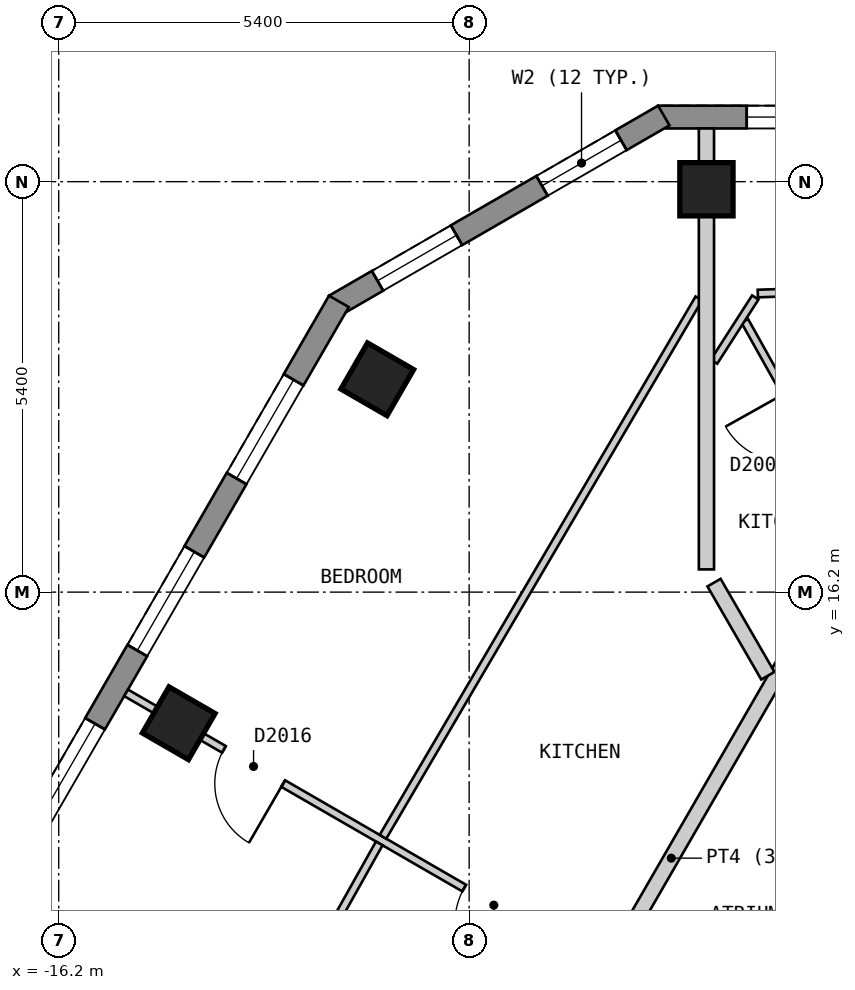
"""IFC4 building model, lengths in metres.
Left out: names, types, materials, properties, quantities, classifications, styles, units other than length and angle.
Written with IfcOpenShell. Run it as: python <this file> out.ifc"""

import sys

from ifc_helpers import new_model, si_unit, direction, frame, frame_2d, origin, origin_2d, place, context, subcontext, project, spatial, polyline, rectangle, outline, extrude, element, fill, save


model = new_model("IFC4")
c1 = context("Model", 3, precision=1e-05, world=origin(), true_north=direction((0.0, 1.0)))
c2 = subcontext(c1, "Body", "Model", "MODEL_VIEW")
j1 = project(units=[si_unit("LENGTHUNIT", "METRE"), si_unit("PLANEANGLEUNIT", "RADIAN")], contexts=[c1])
p1 = place(None, origin())
s1 = spatial("IfcSite", under=j1, at=p1, CompositionType="ELEMENT")
p2 = place(p1, origin())
s2 = spatial("IfcBuilding", under=s1, at=p2, CompositionType="ELEMENT")
p3 = place(p2, frame((0.0, 0.0, 238.8)))
s3 = spatial("IfcBuildingStorey", under=s2, at=p3, CompositionType="ELEMENT", Elevation=238.8)
for number, where, z_axis, x_axis in (
    (1, (-7.678, 21.5, 0.0), (0.0, 0.0, 1.0), (-1.0, 0.0, 0.0)),
    (2, (-12.009, 19.0, 0.0), (0.0, 0.0, 1.0), (-0.5, -0.866, 0.0)),
    (3, (-14.621, 14.475, 0.0), (0.0, 0.0, 1.0), (-0.5, -0.866, 0.0)),
):
    element("IfcColumn", number, at=place(p3, frame(where, z_axis=z_axis, x_axis=x_axis)), inside=s3, PredefinedType="COLUMN", context=c2, shape_type="SweptSolid", body=[
        extrude(rectangle(XDim=0.7, YDim=0.7, at=origin_2d()), origin(), (0.0, 0.0, 1.0), 3.0),
    ])
p4 = place(p3, frame((8.314, 22.45, 0.0), z_axis=(0.0, 0.0, 1.0), x_axis=(-1.0, 0.0, 0.0)))
e4 = element("IfcWall", 4, at=p4, inside=s3, PredefinedType="SOLIDWALL", context=c2, shape_type="SweptSolid", body=[
    extrude(outline(polyline([(0.0, -0.15), (16.628, -0.15), (16.548, 0.15), (0.08, 0.15), (0.0, -0.15)])), origin(), (0.0, 0.0, 1.0), 2.7),
])
p5 = place(p4, frame((1.165, 0.0, 0.15)))
e5 = element("IfcOpeningElement", 5, at=p5, cuts=e4, PredefinedType="OPENING", context=c2, shape_type="SweptSolid", body=[
    extrude(rectangle(XDim=1.5, YDim=2.1, at=frame_2d((0.75, 1.05))), frame((0.0, 0.16, 0.0), z_axis=(0.0, -1.0, 0.0), x_axis=(1.0, 0.0, 0.0)), (0.0, 0.0, 1.0), 0.32),
])
p6 = place(p4, frame((3.724, 0.0, 0.15)))
e6 = element("IfcOpeningElement", 6, at=p6, cuts=e4, PredefinedType="OPENING", context=c2, shape_type="SweptSolid", body=[
    extrude(rectangle(XDim=1.5, YDim=2.1, at=frame_2d((0.75, 1.05))), frame((0.0, 0.16, 0.0), z_axis=(0.0, -1.0, 0.0), x_axis=(1.0, 0.0, 0.0)), (0.0, 0.0, 1.0), 0.32),
])
p7 = place(p4, frame((6.284, 0.0, 0.15)))
e7 = element("IfcOpeningElement", 7, at=p7, cuts=e4, PredefinedType="OPENING", context=c2, shape_type="SweptSolid", body=[
    extrude(rectangle(XDim=1.5, YDim=2.1, at=frame_2d((0.75, 1.05))), frame((0.0, 0.16, 0.0), z_axis=(0.0, -1.0, 0.0), x_axis=(1.0, 0.0, 0.0)), (0.0, 0.0, 1.0), 0.32),
])
p8 = place(p4, frame((8.843, 0.0, 0.15)))
e8 = element("IfcOpeningElement", 8, at=p8, cuts=e4, PredefinedType="OPENING", context=c2, shape_type="SweptSolid", body=[
    extrude(rectangle(XDim=1.5, YDim=2.1, at=frame_2d((0.75, 1.05))), frame((0.0, 0.16, 0.0), z_axis=(0.0, -1.0, 0.0), x_axis=(1.0, 0.0, 0.0)), (0.0, 0.0, 1.0), 0.32),
])
p9 = place(p4, frame((11.403, 0.0, 0.15)))
e9 = element("IfcOpeningElement", 9, at=p9, cuts=e4, PredefinedType="OPENING", context=c2, shape_type="SweptSolid", body=[
    extrude(rectangle(XDim=1.5, YDim=2.1, at=frame_2d((0.75, 1.05))), frame((0.0, 0.16, 0.0), z_axis=(0.0, -1.0, 0.0), x_axis=(1.0, 0.0, 0.0)), (0.0, 0.0, 1.0), 0.32),
])
p10 = place(p4, frame((13.962, 0.0, 0.15)))
e10 = element("IfcOpeningElement", 10, at=p10, cuts=e4, PredefinedType="OPENING", context=c2, shape_type="SweptSolid", body=[
    extrude(rectangle(XDim=1.5, YDim=2.1, at=frame_2d((0.75, 1.05))), frame((0.0, 0.16, 0.0), z_axis=(0.0, -1.0, 0.0), x_axis=(1.0, 0.0, 0.0)), (0.0, 0.0, 1.0), 0.32),
])
p11 = place(p3, frame((-8.239, 22.47, 0.0), z_axis=(0.0, 0.0, 1.0), x_axis=(-0.866022959057, -0.500004234368, 0.0)))
e11 = element("IfcWall", 11, at=p11, inside=s3, PredefinedType="SOLIDWALL", context=c2, shape_type="SweptSolid", body=[
    extrude(outline(polyline([(0.0, -0.15), (5.0, -0.15), (4.92, 0.15), (0.08, 0.15), (0.0, -0.15)])), origin(), (0.0, 0.0, 1.0), 2.7),
])
p12 = place(p11, frame((0.65, 0.0, 0.15)))
e12 = element("IfcOpeningElement", 12, at=p12, cuts=e11, PredefinedType="OPENING", context=c2, shape_type="SweptSolid", body=[
    extrude(rectangle(XDim=1.2, YDim=2.1, at=frame_2d((0.6, 1.05))), frame((0.0, 0.16, 0.0), z_axis=(0.0, -1.0, 0.0), x_axis=(1.0, 0.0, 0.0)), (0.0, 0.0, 1.0), 0.32),
])
p13 = place(p11, frame((3.149, 0.0, 0.15)))
e13 = element("IfcOpeningElement", 13, at=p13, cuts=e11, PredefinedType="OPENING", context=c2, shape_type="SweptSolid", body=[
    extrude(rectangle(XDim=1.2, YDim=2.1, at=frame_2d((0.6, 1.05))), frame((0.0, 0.16, 0.0), z_axis=(0.0, -1.0, 0.0), x_axis=(1.0, 0.0, 0.0)), (0.0, 0.0, 1.0), 0.32),
])
p14 = place(p3, frame((-12.514, 20.025, 0.0), z_axis=(0.0, 0.0, 1.0), x_axis=(-0.500003656944, -0.866023292436, 0.0)))
e14 = element("IfcWall", 14, at=p14, inside=s3, PredefinedType="SOLIDWALL", context=c2, shape_type="SweptSolid", body=[
    extrude(outline(polyline([(0.0, -0.15), (22.17, -0.15), (22.09, 0.15), (0.08, 0.15), (0.0, -0.15)])), origin(), (0.0, 0.0, 1.0), 2.7),
])
p15 = place(p14, frame((1.191, 0.0, 0.15)))
e15 = element("IfcOpeningElement", 15, at=p15, cuts=e14, PredefinedType="OPENING", context=c2, shape_type="SweptSolid", body=[
    extrude(rectangle(XDim=1.5, YDim=2.1, at=frame_2d((0.75, 1.05))), frame((0.0, 0.16, 0.0), z_axis=(0.0, -1.0, 0.0), x_axis=(1.0, 0.0, 0.0)), (0.0, 0.0, 1.0), 0.32),
])
p16 = place(p14, frame((3.804, 0.0, 0.15)))
e16 = element("IfcOpeningElement", 16, at=p16, cuts=e14, PredefinedType="OPENING", context=c2, shape_type="SweptSolid", body=[
    extrude(rectangle(XDim=1.5, YDim=2.1, at=frame_2d((0.75, 1.05))), frame((0.0, 0.16, 0.0), z_axis=(0.0, -1.0, 0.0), x_axis=(1.0, 0.0, 0.0)), (0.0, 0.0, 1.0), 0.32),
])
p17 = place(p14, frame((6.416, 0.0, 0.15)))
e17 = element("IfcOpeningElement", 17, at=p17, cuts=e14, PredefinedType="OPENING", context=c2, shape_type="SweptSolid", body=[
    extrude(rectangle(XDim=1.5, YDim=2.1, at=frame_2d((0.75, 1.05))), frame((0.0, 0.16, 0.0), z_axis=(0.0, -1.0, 0.0), x_axis=(1.0, 0.0, 0.0)), (0.0, 0.0, 1.0), 0.32),
])
p18 = place(p14, frame((9.029, 0.0, 0.15)))
e18 = element("IfcOpeningElement", 18, at=p18, cuts=e14, PredefinedType="OPENING", context=c2, shape_type="SweptSolid", body=[
    extrude(rectangle(XDim=1.5, YDim=2.1, at=frame_2d((0.75, 1.05))), frame((0.0, 0.16, 0.0), z_axis=(0.0, -1.0, 0.0), x_axis=(1.0, 0.0, 0.0)), (0.0, 0.0, 1.0), 0.32),
])
p19 = place(p14, frame((11.641, 0.0, 0.15)))
e19 = element("IfcOpeningElement", 19, at=p19, cuts=e14, PredefinedType="OPENING", context=c2, shape_type="SweptSolid", body=[
    extrude(rectangle(XDim=1.5, YDim=2.1, at=frame_2d((0.75, 1.05))), frame((0.0, 0.16, 0.0), z_axis=(0.0, -1.0, 0.0), x_axis=(1.0, 0.0, 0.0)), (0.0, 0.0, 1.0), 0.32),
])
p20 = place(p14, frame((14.254, 0.0, 0.15)))
e20 = element("IfcOpeningElement", 20, at=p20, cuts=e14, PredefinedType="OPENING", context=c2, shape_type="SweptSolid", body=[
    extrude(rectangle(XDim=1.5, YDim=2.1, at=frame_2d((0.75, 1.05))), frame((0.0, 0.16, 0.0), z_axis=(0.0, -1.0, 0.0), x_axis=(1.0, 0.0, 0.0)), (0.0, 0.0, 1.0), 0.32),
])
p21 = place(p14, frame((16.866, 0.0, 0.15)))
e21 = element("IfcOpeningElement", 21, at=p21, cuts=e14, PredefinedType="OPENING", context=c2, shape_type="SweptSolid", body=[
    extrude(rectangle(XDim=1.5, YDim=2.1, at=frame_2d((0.75, 1.05))), frame((0.0, 0.16, 0.0), z_axis=(0.0, -1.0, 0.0), x_axis=(1.0, 0.0, 0.0)), (0.0, 0.0, 1.0), 0.32),
])
p22 = place(p14, frame((19.479, 0.0, 0.15)))
e22 = element("IfcOpeningElement", 22, at=p22, cuts=e14, PredefinedType="OPENING", context=c2, shape_type="SweptSolid", body=[
    extrude(rectangle(XDim=1.5, YDim=2.1, at=frame_2d((0.75, 1.05))), frame((0.0, 0.16, 0.0), z_axis=(0.0, -1.0, 0.0), x_axis=(1.0, 0.0, 0.0)), (0.0, 0.0, 1.0), 0.32),
])
p23 = place(p3, frame((-10.854, 8.0, 0.0), z_axis=(0.0, 0.0, 1.0), x_axis=(0.499997637144, 0.866026767976, 0.0)))
e23 = element("IfcWall", 23, at=p23, inside=s3, PredefinedType="PARTITIONING", context=c2, shape_type="SweptSolid", body=[
    extrude(rectangle(XDim=10.854, YDim=0.2, at=frame_2d((5.427, 0.0))), origin(), (0.0, 0.0, 1.0), 2.7),
])
p24 = place(p23, frame((0.612, 0.0, 0.0)))
e24 = element("IfcOpeningElement", 24, at=p24, cuts=e23, PredefinedType="OPENING", context=c2, shape_type="SweptSolid", body=[
    extrude(rectangle(XDim=1.0, YDim=2.1, at=frame_2d((0.5, 1.05))), frame((0.0, 0.11, 0.0), z_axis=(0.0, -1.0, 0.0), x_axis=(1.0, 0.0, 0.0)), (0.0, 0.0, 1.0), 0.22),
])
p25 = place(p3, frame((-7.174, 19.769, 0.0), z_axis=(0.0, 0.0, 1.0), x_axis=(0.488445917321, -0.872594170192, 0.0)))
e25 = element("IfcWall", 25, at=p25, inside=s3, PredefinedType="PARTITIONING", context=c2, shape_type="SweptSolid", body=[
    extrude(rectangle(XDim=3.022, YDim=0.1, at=frame_2d((1.511, 0.0))), origin(), (0.0, 0.0, 1.0), 2.7),
])
p26 = place(p25, frame((1.091, 0.0, 0.0)))
e26 = element("IfcOpeningElement", 26, at=p26, cuts=e25, PredefinedType="OPENING", context=c2, shape_type="SweptSolid", body=[
    extrude(rectangle(XDim=0.9, YDim=2.1, at=frame_2d((0.45, 1.05))), frame((0.0, 0.06, 0.0), z_axis=(0.0, -1.0, 0.0), x_axis=(1.0, 0.0, 0.0)), (0.0, 0.0, 1.0), 0.12),
])
p27 = place(p3, frame((-15.314, 14.875, 0.0), z_axis=(0.0, 0.0, 1.0), x_axis=(0.866001485781, -0.500041424909, 0.0)))
e27 = element("IfcWall", 27, at=p27, inside=s3, PredefinedType="PARTITIONING", context=c2, shape_type="SweptSolid", body=[
    extrude(rectangle(XDim=7.2, YDim=0.1, at=frame_2d((3.6, 0.0))), origin(), (0.0, 0.0, 1.0), 2.7),
])
p28 = place(p27, frame((5.137, 0.0, 0.0)))
e28 = element("IfcOpeningElement", 28, at=p28, cuts=e27, PredefinedType="OPENING", context=c2, shape_type="SweptSolid", body=[
    extrude(rectangle(XDim=0.9, YDim=2.1, at=frame_2d((0.45, 1.05))), frame((0.0, 0.06, 0.0), z_axis=(0.0, -1.0, 0.0), x_axis=(1.0, 0.0, 0.0)), (0.0, 0.0, 1.0), 0.12),
])
p29 = place(p27, frame((1.487, 0.0, 0.0)))
e29 = element("IfcOpeningElement", 29, at=p29, cuts=e27, PredefinedType="OPENING", context=c2, shape_type="SweptSolid", body=[
    extrude(rectangle(XDim=0.9, YDim=2.1, at=frame_2d((0.45, 1.05))), frame((0.0, 0.06, 0.0), z_axis=(0.0, -1.0, 0.0), x_axis=(1.0, 0.0, 0.0)), (0.0, 0.0, 1.0), 0.12),
])
p30 = place(p3, frame((-7.578, 19.232, 0.0), z_axis=(0.0, 0.0, 1.0), x_axis=(0.540597871913, 0.841281130707, 0.0)))
e30 = element("IfcWall", 30, at=p30, inside=s3, PredefinedType="PARTITIONING", context=c2, shape_type="SweptSolid", body=[
    extrude(rectangle(XDim=1.004, YDim=0.1, at=frame_2d((0.502, 0.0))), origin(), (0.0, 0.0, 1.0), 2.7),
])
p31 = place(p3, frame((-11.934, 12.981, 0.0), z_axis=(0.0, 0.0, 1.0), x_axis=(0.506072703404, 0.862490822484, 0.0)))
e31 = element("IfcWall", 31, at=p31, inside=s3, PredefinedType="PARTITIONING", context=c2, shape_type="SweptSolid", body=[
    extrude(rectangle(XDim=8.212, YDim=0.1, at=frame_2d((4.106, 0.0))), origin(), (0.0, 0.0, 1.0), 2.7),
])
p32 = place(p3, frame((-14.488, 8.423, 0.0), z_axis=(0.0, 0.0, 1.0), x_axis=(0.488810791055, 0.872389827169, 0.0)))
e32 = element("IfcWall", 32, at=p32, inside=s3, PredefinedType="PARTITIONING", context=c2, shape_type="SweptSolid", body=[
    extrude(rectangle(XDim=5.125, YDim=0.1, at=frame_2d((2.562, 0.0))), origin(), (0.0, 0.0, 1.0), 2.7),
])
p33 = place(p32, frame((2.113, 0.0, 0.0)))
e33 = element("IfcOpeningElement", 33, at=p33, cuts=e32, PredefinedType="OPENING", context=c2, shape_type="SweptSolid", body=[
    extrude(rectangle(XDim=0.9, YDim=2.1, at=frame_2d((0.45, 1.05))), frame((0.0, 0.06, 0.0), z_axis=(0.0, -1.0, 0.0), x_axis=(1.0, 0.0, 0.0)), (0.0, 0.0, 1.0), 0.12),
])
p34 = place(p3, frame((-7.002, 20.128, 0.0), z_axis=(0.0, 0.0, 1.0), x_axis=(0.999429293715, 0.033779977274, 0.0)))
e34 = element("IfcWall", 34, at=p34, inside=s3, PredefinedType="PARTITIONING", context=c2, shape_type="SweptSolid", body=[
    extrude(rectangle(XDim=2.132, YDim=0.1, at=frame_2d((1.066, 0.0))), origin(), (0.0, 0.0, 1.0), 2.7),
])
p35 = place(p34, frame((0.616, 0.0, 0.0)))
e35 = element("IfcOpeningElement", 35, at=p35, cuts=e34, PredefinedType="OPENING", context=c2, shape_type="SweptSolid", body=[
    extrude(rectangle(XDim=0.9, YDim=2.1, at=frame_2d((0.45, 1.05))), frame((0.0, 0.06, 0.0), z_axis=(0.0, -1.0, 0.0), x_axis=(1.0, 0.0, 0.0)), (0.0, 0.0, 1.0), 0.12),
])
p36 = place(p3, frame((-7.578, 16.325, 0.0), z_axis=(0.0, 0.0, 1.0), x_axis=(0.500314976313, -0.865843475737, 0.0)))
e36 = element("IfcWall", 36, at=p36, inside=s3, PredefinedType="PARTITIONING", context=c2, shape_type="SweptSolid", body=[
    extrude(rectangle(XDim=1.415, YDim=0.2, at=frame_2d((0.707, 0.0))), origin(), (0.0, 0.0, 1.0), 2.7),
])
p37 = place(p3, frame((-7.678, 16.499, 0.0), z_axis=(0.0, 0.0, 1.0), x_axis=(0.0, 1.0, 0.0)))
e37 = element("IfcWall", 37, at=p37, inside=s3, PredefinedType="PARTITIONING", context=c2, shape_type="SweptSolid", body=[
    extrude(rectangle(XDim=5.801, YDim=0.2, at=frame_2d((2.9, 0.0))), origin(), (0.0, 0.0, 1.0), 2.7),
])
p38 = place(p10, origin())
e38 = element("IfcWindow", 38, at=p38, inside=s3, PartitioningType="SINGLE_PANEL", PredefinedType="WINDOW", context=c2, shape_type="SweptSolid", body=[
    extrude(rectangle(XDim=1.5, YDim=2.1, at=frame_2d((0.75, 1.05))), frame((0.0, 0.03, 0.0), z_axis=(0.0, -1.0, 0.0), x_axis=(1.0, 0.0, 0.0)), (0.0, 0.0, 1.0), 0.06),
])
fill(e10, e38)
p39 = place(p12, origin())
e39 = element("IfcWindow", 39, at=p39, inside=s3, PartitioningType="SINGLE_PANEL", PredefinedType="WINDOW", context=c2, shape_type="SweptSolid", body=[
    extrude(rectangle(XDim=1.2, YDim=2.1, at=frame_2d((0.6, 1.05))), frame((0.0, 0.03, 0.0), z_axis=(0.0, -1.0, 0.0), x_axis=(1.0, 0.0, 0.0)), (0.0, 0.0, 1.0), 0.06),
])
fill(e12, e39)
p40 = place(p13, origin())
e40 = element("IfcWindow", 40, at=p40, inside=s3, PartitioningType="SINGLE_PANEL", PredefinedType="WINDOW", context=c2, shape_type="SweptSolid", body=[
    extrude(rectangle(XDim=1.2, YDim=2.1, at=frame_2d((0.6, 1.05))), frame((0.0, 0.03, 0.0), z_axis=(0.0, -1.0, 0.0), x_axis=(1.0, 0.0, 0.0)), (0.0, 0.0, 1.0), 0.06),
])
fill(e13, e40)
p41 = place(p15, origin())
e41 = element("IfcWindow", 41, at=p41, inside=s3, PartitioningType="SINGLE_PANEL", PredefinedType="WINDOW", context=c2, shape_type="SweptSolid", body=[
    extrude(rectangle(XDim=1.5, YDim=2.1, at=frame_2d((0.75, 1.05))), frame((0.0, 0.03, 0.0), z_axis=(0.0, -1.0, 0.0), x_axis=(1.0, 0.0, 0.0)), (0.0, 0.0, 1.0), 0.06),
])
fill(e15, e41)
p42 = place(p16, origin())
e42 = element("IfcWindow", 42, at=p42, inside=s3, PartitioningType="SINGLE_PANEL", PredefinedType="WINDOW", context=c2, shape_type="SweptSolid", body=[
    extrude(rectangle(XDim=1.5, YDim=2.1, at=frame_2d((0.75, 1.05))), frame((0.0, 0.03, 0.0), z_axis=(0.0, -1.0, 0.0), x_axis=(1.0, 0.0, 0.0)), (0.0, 0.0, 1.0), 0.06),
])
fill(e16, e42)
p43 = place(p17, origin())
e43 = element("IfcWindow", 43, at=p43, inside=s3, PartitioningType="SINGLE_PANEL", PredefinedType="WINDOW", context=c2, shape_type="SweptSolid", body=[
    extrude(rectangle(XDim=1.5, YDim=2.1, at=frame_2d((0.75, 1.05))), frame((0.0, 0.03, 0.0), z_axis=(0.0, -1.0, 0.0), x_axis=(1.0, 0.0, 0.0)), (0.0, 0.0, 1.0), 0.06),
])
fill(e17, e43)
p44 = place(p28, origin())
e44 = element("IfcDoor", 44, at=p44, inside=s3, OperationType="SINGLE_SWING_RIGHT", PredefinedType="DOOR", context=c2, shape_type="SweptSolid", body=[
    extrude(rectangle(XDim=0.9, YDim=2.1, at=frame_2d((0.45, 1.05))), frame((0.0, 0.025, 0.0), z_axis=(0.0, -1.0, 0.0), x_axis=(1.0, 0.0, 0.0)), (0.0, 0.0, 1.0), 0.05),
])
fill(e28, e44)
p45 = place(p29, origin())
e45 = element("IfcDoor", 45, at=p45, inside=s3, OperationType="SINGLE_SWING_RIGHT", PredefinedType="DOOR", context=c2, shape_type="SweptSolid", body=[
    extrude(rectangle(XDim=0.9, YDim=2.1, at=frame_2d((0.45, 1.05))), frame((0.0, 0.025, 0.0), z_axis=(0.0, -1.0, 0.0), x_axis=(1.0, 0.0, 0.0)), (0.0, 0.0, 1.0), 0.05),
])
fill(e29, e45)
save(model, sys.argv[1])
